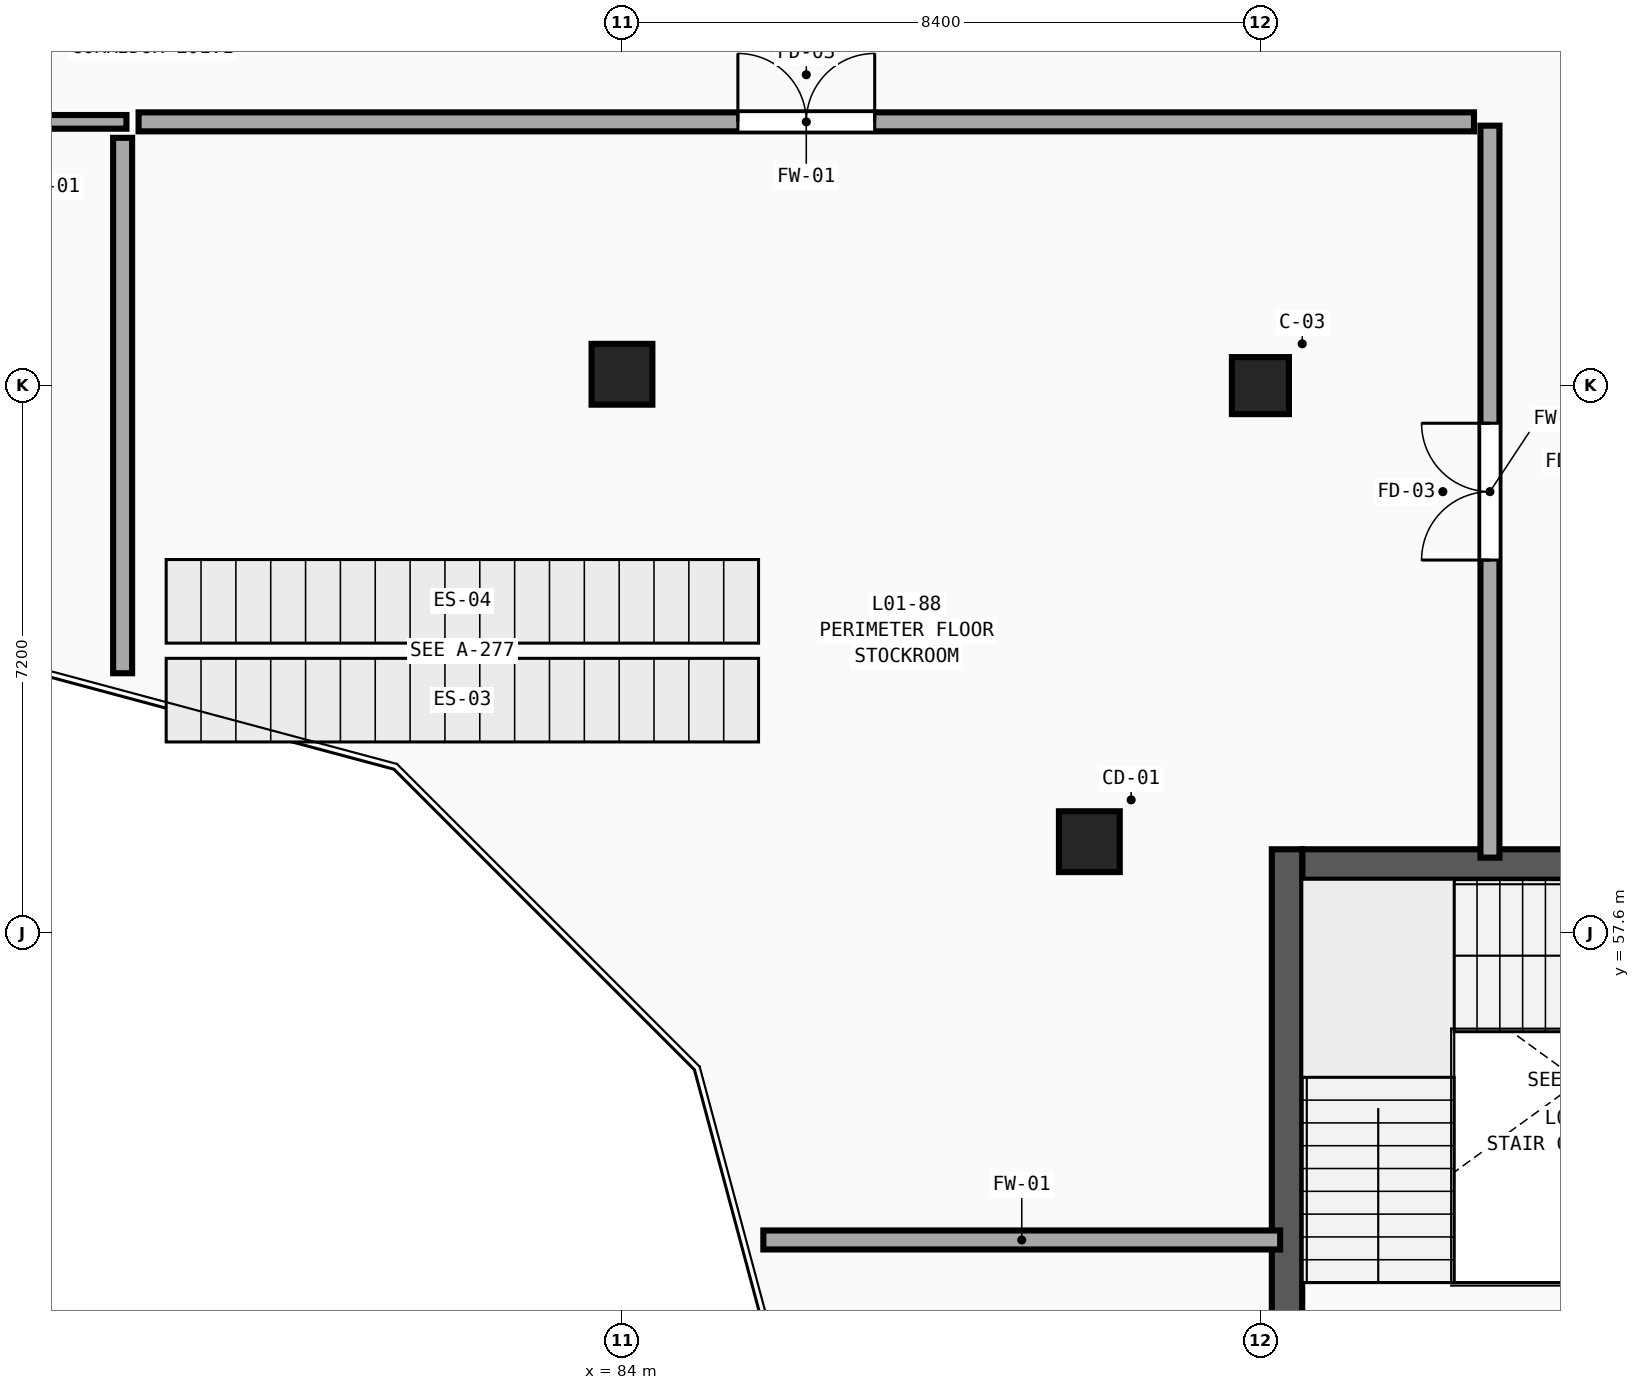
"""IFC4 building model, lengths in metres.
Left out: names, types, materials, properties, quantities, classifications, styles, units other than length and angle.
Written with IfcOpenShell. Run it as: python <this file> out.ifc"""

import sys

from ifc_helpers import new_model, si_unit, direction, frame, frame_2d, origin, origin_2d, place, context, subcontext, project, spatial, rectangle, circle, extrude, element, fill, save


model = new_model("IFC4")
c1 = context("Model", 3, precision=1e-05, world=origin(), true_north=direction((0.0, 1.0)))
c2 = subcontext(c1, "Body", "Model", "MODEL_VIEW")
j1 = project(units=[si_unit("LENGTHUNIT", "METRE"), si_unit("PLANEANGLEUNIT", "RADIAN")], contexts=[c1])
p1 = place(None, origin())
s1 = spatial("IfcSite", under=j1, at=p1, CompositionType="ELEMENT")
p2 = place(p1, origin())
s2 = spatial("IfcBuilding", under=s1, at=p2, CompositionType="ELEMENT")
p3 = place(p2, frame((0.0, 0.0, 5.4)))
s3 = spatial("IfcBuildingStorey", under=s2, at=p3, CompositionType="ELEMENT", Elevation=5.4)
p4 = place(p3, frame((92.4, 64.8, 0.0), z_axis=(0.0, 0.0, 1.0), x_axis=(1.0, 0.0, 0.0)))
e1 = element("IfcColumn", 1, at=p4, inside=s3, PredefinedType="COLUMN", context=c2, shape_type="SweptSolid", body=[
    extrude(rectangle(XDim=0.75, YDim=0.75, at=origin_2d()), origin(), (0.0, 0.0, 1.0), 4.5),
])
for number, where, z_axis, x_axis in (
    (2, (90.149, 58.8, 0.0), (0.0, 0.0, 1.0), (1.0, 0.0, 0.0)),
    (3, (84.0, 64.949, 0.0), (0.0, 0.0, 1.0), (1.0, 0.0, 0.0)),
):
    element("IfcColumn", number, at=place(p3, frame(where, z_axis=z_axis, x_axis=x_axis)), inside=s3, PredefinedType="COLUMN", context=c2, shape_type="SweptSolid", body=[
        extrude(circle(Radius=0.4, at=origin_2d()), origin(), (0.0, 0.0, 1.0), 4.5),
    ])
p5 = place(p3, frame((92.95, 58.5, 0.0), z_axis=(0.0, 0.0, 1.0), x_axis=(1.0, 0.0, 0.0)))
e4 = element("IfcWall", 4, at=p5, inside=s3, PredefinedType="SHEAR", context=c2, shape_type="SweptSolid", body=[
    extrude(rectangle(XDim=7.3, YDim=0.4, at=frame_2d((3.65, 0.0))), origin(), (0.0, 0.0, 1.0), 4.5),
])
p6 = place(p3, frame((92.75, 58.7, 0.0), z_axis=(0.0, 0.0, 1.0), x_axis=(0.0, -1.0, 0.0)))
e5 = element("IfcWall", 5, at=p6, inside=s3, PredefinedType="SHEAR", context=c2, shape_type="SweptSolid", body=[
    extrude(rectangle(XDim=8.25, YDim=0.4, at=frame_2d((4.125, 0.0))), origin(), (0.0, 0.0, 1.0), 4.5),
])
p7 = place(p3, frame((55.68, 68.27, 0.0), z_axis=(0.0, 0.0, 1.0), x_axis=(1.0, 0.0, 0.0)))
e6 = element("IfcWall", 6, at=p7, inside=s3, PredefinedType="PARTITIONING", context=c2, shape_type="SweptSolid", body=[
    extrude(rectangle(XDim=21.8, YDim=0.18, at=frame_2d((10.9, 0.0))), origin(), (0.0, 0.0, 1.0), 4.18),
])
p8 = place(p7, frame((10.38, 0.0, 0.0)))
e7 = element("IfcOpeningElement", 7, at=p8, cuts=e6, PredefinedType="OPENING", context=c2, shape_type="SweptSolid", body=[
    extrude(rectangle(XDim=1.04, YDim=2.37, at=frame_2d((0.52, 1.185))), frame((0.0, 0.11, 0.0), z_axis=(0.0, -1.0, 0.0), x_axis=(1.0, 0.0, 0.0)), (0.0, 0.0, 1.0), 0.22),
])
p9 = place(p3, frame((77.64, 68.27, 0.0), z_axis=(0.0, 0.0, 1.0), x_axis=(1.0, 0.0, 0.0)))
e8 = element("IfcWall", 8, at=p9, inside=s3, PredefinedType="SOLIDWALL", context=c2, shape_type="SweptSolid", body=[
    extrude(rectangle(XDim=17.57, YDim=0.25, at=frame_2d((8.785, 0.0))), origin(), (0.0, 0.0, 1.0), 4.18),
])
p10 = place(p9, frame((7.885, 0.0, 0.0)))
e9 = element("IfcOpeningElement", 9, at=p10, cuts=e8, PredefinedType="OPENING", context=c2, shape_type="SweptSolid", body=[
    extrude(rectangle(XDim=1.8, YDim=2.3, at=frame_2d((0.9, 1.15))), frame((0.0, 0.145, 0.0), z_axis=(0.0, -1.0, 0.0), x_axis=(1.0, 0.0, 0.0)), (0.0, 0.0, 1.0), 0.29),
])
p11 = place(p3, frame((95.42, 58.59, 0.0), z_axis=(0.0, 0.0, 1.0), x_axis=(0.0, 1.0, 0.0)))
e10 = element("IfcWall", 10, at=p11, inside=s3, PredefinedType="SOLIDWALL", context=c2, shape_type="SweptSolid", body=[
    extrude(rectangle(XDim=9.63, YDim=0.25, at=frame_2d((4.815, 0.0))), origin(), (0.0, 0.0, 1.0), 4.18),
])
p12 = place(p11, frame((3.915, 0.0, 0.0)))
e11 = element("IfcOpeningElement", 11, at=p12, cuts=e10, PredefinedType="OPENING", context=c2, shape_type="SweptSolid", body=[
    extrude(rectangle(XDim=1.8, YDim=2.3, at=frame_2d((0.9, 1.15))), frame((0.0, 0.145, 0.0), z_axis=(0.0, -1.0, 0.0), x_axis=(1.0, 0.0, 0.0)), (0.0, 0.0, 1.0), 0.29),
])
p13 = place(p3, frame((77.43, 61.016, 0.0), z_axis=(0.0, 0.0, 1.0), x_axis=(0.0, 1.0, 0.0)))
e12 = element("IfcWall", 12, at=p13, inside=s3, PredefinedType="SOLIDWALL", context=c2, shape_type="SweptSolid", body=[
    extrude(rectangle(XDim=7.044, YDim=0.25, at=frame_2d((3.522, 0.0))), origin(), (0.0, 0.0, 1.0), 4.18),
])
p14 = place(p3, frame((85.86, 53.56, 0.0), z_axis=(0.0, 0.0, 1.0), x_axis=(1.0, 0.0, 0.0)))
e13 = element("IfcWall", 13, at=p14, inside=s3, PredefinedType="SOLIDWALL", context=c2, shape_type="SweptSolid", body=[
    extrude(rectangle(XDim=6.8, YDim=0.25, at=frame_2d((3.4, 0.0))), origin(), (0.0, 0.0, 1.0), 4.18),
])
p15 = place(p10, origin())
e14 = element("IfcDoor", 14, at=p15, inside=s3, OperationType="DOUBLE_DOOR_SINGLE_SWING", PredefinedType="DOOR", context=c2, shape_type="SweptSolid", body=[
    extrude(rectangle(XDim=1.8, YDim=2.3, at=frame_2d((0.9, 1.15))), frame((0.0, 0.025, 0.0), z_axis=(0.0, -1.0, 0.0), x_axis=(1.0, 0.0, 0.0)), (0.0, 0.0, 1.0), 0.05),
])
fill(e9, e14)
p16 = place(p12, origin())
e15 = element("IfcDoor", 15, at=p16, inside=s3, OperationType="DOUBLE_DOOR_SINGLE_SWING", PredefinedType="DOOR", context=c2, shape_type="SweptSolid", body=[
    extrude(rectangle(XDim=1.8, YDim=2.3, at=frame_2d((0.9, 1.15))), frame((0.0, 0.025, 0.0), z_axis=(0.0, -1.0, 0.0), x_axis=(1.0, 0.0, 0.0)), (0.0, 0.0, 1.0), 0.05),
])
fill(e11, e15)
save(model, sys.argv[1])
